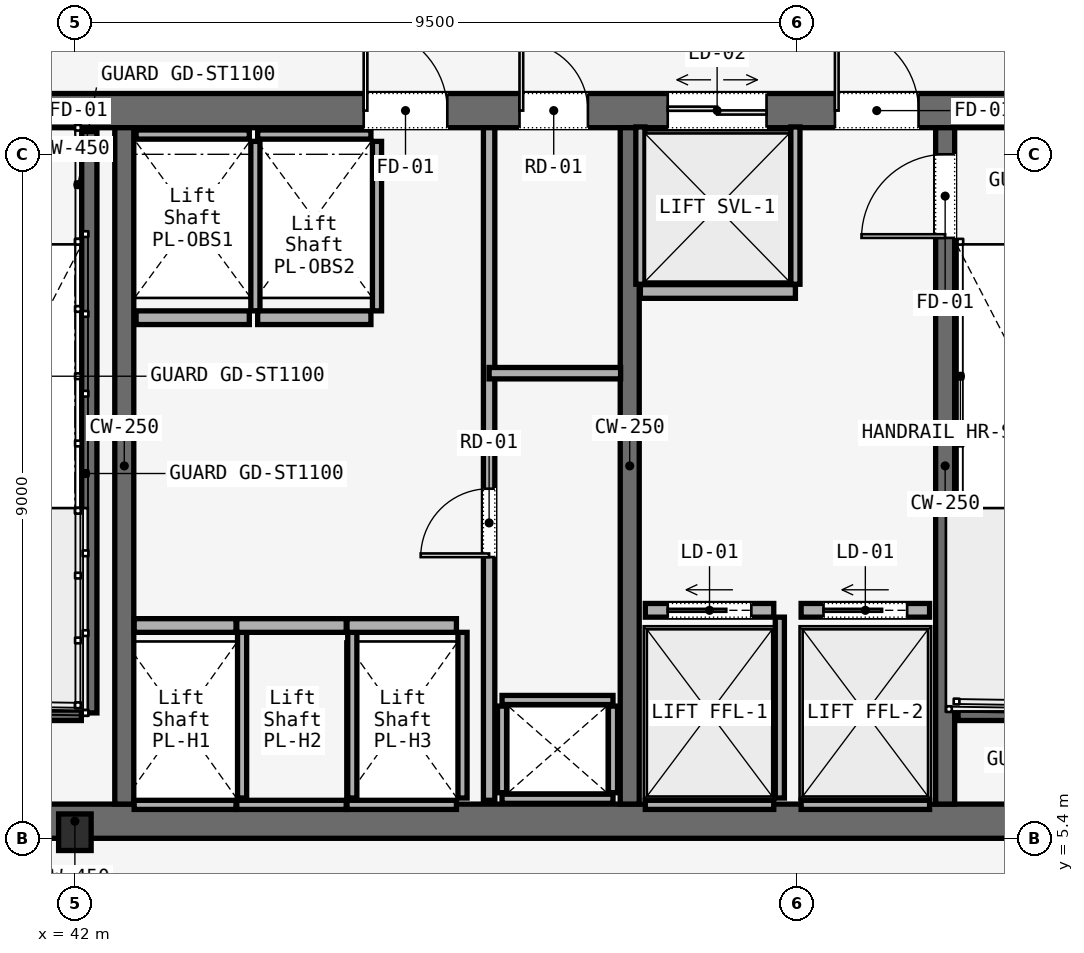
"""IFC4 building model, lengths in metres.
Left out: names, types, materials, properties, quantities, classifications, styles, units other than length and angle.
Written with IfcOpenShell. Run it as: python <this file> out.ifc"""

import sys

from ifc_helpers import new_model, si_unit, direction, frame, frame_2d, origin, origin_2d, place, context, subcontext, project, spatial, rectangle, i_section, extrude, element, fill, save


model = new_model("IFC4")
c1 = context("Model", 3, precision=1e-05, world=origin(), true_north=direction((0.0, 1.0)))
c2 = subcontext(c1, "Body", "Model", "MODEL_VIEW")
j1 = project(units=[si_unit("LENGTHUNIT", "METRE"), si_unit("PLANEANGLEUNIT", "RADIAN")], contexts=[c1])
p1 = place(None, origin())
s1 = spatial("IfcSite", under=j1, at=p1, CompositionType="ELEMENT")
p2 = place(p1, origin())
s2 = spatial("IfcBuilding", under=s1, at=p2, CompositionType="ELEMENT")
p3 = place(p2, frame((0.0, 0.0, 122.2)))
s3 = spatial("IfcBuildingStorey", under=s2, at=p3, CompositionType="ELEMENT", Elevation=122.2)
p4 = place(p3, frame((26.45, 14.975, 0.0), z_axis=(0.0, 0.0, 1.0), x_axis=(1.0, 0.0, 0.0)))
e1 = element("IfcWall", 1, at=p4, inside=s3, PredefinedType="SOLIDWALL", context=c2, shape_type="SweptSolid", body=[
    extrude(rectangle(XDim=31.1, YDim=0.45, at=frame_2d((15.55, 0.0))), origin(), (0.0, 0.0, 1.0), 4.58),
])
p5 = place(p4, frame((1.65, 0.0, 0.0)))
e2 = element("IfcOpeningElement", 2, at=p5, cuts=e1, PredefinedType="OPENING", context=c2, shape_type="SweptSolid", body=[
    extrude(rectangle(XDim=1.1, YDim=2.2, at=frame_2d((0.55, 1.1))), frame((0.0, 0.225, 0.0), z_axis=(0.0, -1.0, 0.0), x_axis=(1.0, 0.0, 0.0)), (0.0, 0.0, 1.0), 0.45),
])
p6 = place(p4, frame((13.65, 0.0, 0.0)))
e3 = element("IfcOpeningElement", 3, at=p6, cuts=e1, PredefinedType="OPENING", context=c2, shape_type="SweptSolid", body=[
    extrude(rectangle(XDim=1.1, YDim=2.2, at=frame_2d((0.55, 1.1))), frame((0.0, 0.225, 0.0), z_axis=(0.0, -1.0, 0.0), x_axis=(1.0, 0.0, 0.0)), (0.0, 0.0, 1.0), 0.45),
])
p7 = place(p4, frame((25.55, 0.0, 0.0)))
e4 = element("IfcOpeningElement", 4, at=p7, cuts=e1, PredefinedType="OPENING", context=c2, shape_type="SweptSolid", body=[
    extrude(rectangle(XDim=1.1, YDim=2.2, at=frame_2d((0.55, 1.1))), frame((0.0, 0.225, 0.0), z_axis=(0.0, -1.0, 0.0), x_axis=(1.0, 0.0, 0.0)), (0.0, 0.0, 1.0), 0.45),
])
p8 = place(p4, frame((10.7, 0.0, 0.0)))
e5 = element("IfcOpeningElement", 5, at=p8, cuts=e1, PredefinedType="OPENING", context=c2, shape_type="SweptSolid", body=[
    extrude(rectangle(XDim=1.4, YDim=2.2, at=frame_2d((0.7, 1.1))), frame((0.0, 0.225, 0.0), z_axis=(0.0, -1.0, 0.0), x_axis=(1.0, 0.0, 0.0)), (0.0, 0.0, 1.0), 0.45),
])
p9 = place(p4, frame((19.35, 0.0, 0.0)))
e6 = element("IfcOpeningElement", 6, at=p9, cuts=e1, PredefinedType="OPENING", context=c2, shape_type="SweptSolid", body=[
    extrude(rectangle(XDim=1.1, YDim=2.2, at=frame_2d((0.55, 1.1))), frame((0.0, 0.225, 0.0), z_axis=(0.0, -1.0, 0.0), x_axis=(1.0, 0.0, 0.0)), (0.0, 0.0, 1.0), 0.45),
])
p10 = place(p4, frame((21.4, 0.0, 0.0)))
e7 = element("IfcOpeningElement", 7, at=p10, cuts=e1, PredefinedType="OPENING", context=c2, shape_type="SweptSolid", body=[
    extrude(rectangle(XDim=0.9, YDim=2.1, at=frame_2d((0.45, 1.05))), frame((0.0, 0.225, 0.0), z_axis=(0.0, -1.0, 0.0), x_axis=(1.0, 0.0, 0.0)), (0.0, 0.0, 1.0), 0.45),
])
p11 = place(p4, frame((23.35, 0.0, 0.0)))
e8 = element("IfcOpeningElement", 8, at=p11, cuts=e1, PredefinedType="OPENING", context=c2, shape_type="SweptSolid", body=[
    extrude(rectangle(XDim=1.3, YDim=2.3, at=frame_2d((0.65, 1.15))), frame((0.0, 0.225, 0.0), z_axis=(0.0, -1.0, 0.0), x_axis=(1.0, 0.0, 0.0)), (0.0, 0.0, 1.0), 0.45),
])
p12 = place(p3, frame((26.45, 5.625, 0.0), z_axis=(0.0, 0.0, 1.0), x_axis=(1.0, 0.0, 0.0)))
e9 = element("IfcWall", 9, at=p12, inside=s3, PredefinedType="SOLIDWALL", context=c2, shape_type="SweptSolid", body=[
    extrude(rectangle(XDim=31.1, YDim=0.45, at=frame_2d((15.55, 0.0))), origin(), (0.0, 0.0, 1.0), 4.58),
])
for number, where, z_axis, x_axis in (
    (10, (42.65, 5.85, 0.0), (0.0, 0.0, 1.0), (0.0, 1.0, 0.0)),
    (11, (49.3, 5.85, 0.0), (0.0, 0.0, 1.0), (0.0, 1.0, 0.0)),
):
    element("IfcWall", number, at=place(p3, frame(where, z_axis=z_axis, x_axis=x_axis)), inside=s3, PredefinedType="SOLIDWALL", context=c2, shape_type="SweptSolid", body=[
        extrude(rectangle(XDim=8.9, YDim=0.25, at=frame_2d((4.45, 0.0))), origin(), (0.0, 0.0, 1.0), 4.58),
    ])
p13 = place(p3, frame((53.45, 5.85, 0.0), z_axis=(0.0, 0.0, 1.0), x_axis=(0.0, 1.0, 0.0)))
e12 = element("IfcWall", 12, at=p13, inside=s3, PredefinedType="SOLIDWALL", context=c2, shape_type="SweptSolid", body=[
    extrude(rectangle(XDim=8.9, YDim=0.25, at=frame_2d((4.45, 0.0))), origin(), (0.0, 0.0, 1.0), 4.58),
])
p14 = place(p13, frame((7.45, 0.0, 0.0)))
e13 = element("IfcOpeningElement", 13, at=p14, cuts=e12, PredefinedType="OPENING", context=c2, shape_type="SweptSolid", body=[
    extrude(rectangle(XDim=1.1, YDim=2.2, at=frame_2d((0.55, 1.1))), frame((0.0, 0.125, 0.0), z_axis=(0.0, -1.0, 0.0), x_axis=(1.0, 0.0, 0.0)), (0.0, 0.0, 1.0), 0.25),
])
p15 = place(p3, frame((42.0, 5.48, 0.0), z_axis=(0.0, 0.0, 1.0), x_axis=(1.0, 0.0, 0.0)))
e14 = element("IfcColumn", 14, at=p15, inside=s3, PredefinedType="COLUMN", context=c2, shape_type="SweptSolid", body=[
    extrude(i_section(OverallWidth=0.428, OverallDepth=0.481, WebThickness=0.051, FlangeThickness=0.065, FilletRadius=0.015, at=origin_2d()), origin(), (0.0, 0.0, 1.0), 4.58),
])
p16 = place(p3, frame((42.19, 14.7, 0.0), z_axis=(0.0, 0.0, 1.0), x_axis=(0.0, -1.0, 0.0)))
e15 = element("IfcWall", 15, at=p16, inside=s3, PredefinedType="SOLIDWALL", context=c2, shape_type="SweptSolid", body=[
    extrude(rectangle(XDim=7.65, YDim=0.2, at=frame_2d((3.825, 0.0))), origin(), (0.0, 0.0, 1.0), 4.8),
])
for number, where, z_axis, x_axis in (
    (16, (38.97, 7.05, 0.0), (0.0, 0.0, 1.0), (1.0, 0.0, 0.0)),
    (17, (53.62, 7.05, 0.0), (0.0, 0.0, 1.0), (1.0, 0.0, 0.0)),
):
    element("IfcWall", number, at=place(p3, frame(where, z_axis=z_axis, x_axis=x_axis)), inside=s3, PredefinedType="SOLIDWALL", context=c2, shape_type="SweptSolid", body=[
        extrude(rectangle(XDim=3.115, YDim=0.2, at=frame_2d((1.558, 0.0))), origin(), (0.0, 0.0, 1.0), 4.8),
    ])
for number, where, z_axis, x_axis in (
    (18, (47.62, 5.92, 0.0), (0.0, 0.0, 1.0), (1.0, 0.0, 0.0)),
    (19, (47.62, 7.22, 0.0), (0.0, 0.0, 1.0), (1.0, 0.0, 0.0)),
):
    element("IfcWall", number, at=place(p3, frame(where, z_axis=z_axis, x_axis=x_axis)), inside=s3, PredefinedType="SOLIDWALL", context=c2, shape_type="SweptSolid", body=[
        extrude(rectangle(XDim=1.46, YDim=0.12, at=frame_2d((0.73, 0.0))), origin(), (0.0, 0.0, 1.0), 4.01),
    ])
for number, where, z_axis, x_axis in (
    (20, (47.62, 6.0, 0.0), (0.0, 0.0, 1.0), (0.0, 1.0, 0.0)),
    (21, (49.08, 6.0, 0.0), (0.0, 0.0, 1.0), (0.0, 1.0, 0.0)),
):
    element("IfcWall", number, at=place(p3, frame(where, z_axis=z_axis, x_axis=x_axis)), inside=s3, PredefinedType="SOLIDWALL", context=c2, shape_type="SweptSolid", body=[
        extrude(rectangle(XDim=1.14, YDim=0.12, at=frame_2d((0.57, 0.0))), origin(), (0.0, 0.0, 1.0), 4.01),
    ])
p17 = place(p3, frame((47.45, 5.9, 0.0), z_axis=(0.0, 0.0, 1.0), x_axis=(0.0, 1.0, 0.0)))
e22 = element("IfcWall", 22, at=p17, inside=s3, PredefinedType="PARTITIONING", context=c2, shape_type="SweptSolid", body=[
    extrude(rectangle(XDim=8.85, YDim=0.15, at=frame_2d((4.425, 0.0))), origin(), (0.0, 0.0, 1.0), 4.01),
])
p18 = place(p17, frame((3.2, 0.0, 0.0)))
e23 = element("IfcOpeningElement", 23, at=p18, cuts=e22, PredefinedType="OPENING", context=c2, shape_type="SweptSolid", body=[
    extrude(rectangle(XDim=0.9, YDim=2.1, at=frame_2d((0.45, 1.05))), frame((0.0, 0.075, 0.0), z_axis=(0.0, -1.0, 0.0), x_axis=(1.0, 0.0, 0.0)), (0.0, 0.0, 1.0), 0.15),
])
p19 = place(p3, frame((47.45, 11.52, 0.0), z_axis=(0.0, 0.0, 1.0), x_axis=(1.0, 0.0, 0.0)))
e24 = element("IfcWall", 24, at=p19, inside=s3, PredefinedType="PARTITIONING", context=c2, shape_type="SweptSolid", body=[
    extrude(rectangle(XDim=1.73, YDim=0.15, at=frame_2d((0.865, 0.0))), origin(), (0.0, 0.0, 1.0), 4.01),
])
p20 = place(p3, frame((42.78, 8.2, 0.0), z_axis=(0.0, 0.0, 1.0), x_axis=(1.0, 0.0, 0.0)))
e25 = element("IfcWall", 25, at=p20, inside=s3, PredefinedType="SOLIDWALL", context=c2, shape_type="SweptSolid", body=[
    extrude(rectangle(XDim=1.34, YDim=0.18, at=frame_2d((0.67, 0.0))), origin(), (0.0, 0.0, 1.0), 4.01),
])
p21 = place(p3, frame((42.78, 5.84, 0.0), z_axis=(0.0, 0.0, 1.0), x_axis=(1.0, 0.0, 0.0)))
e26 = element("IfcWall", 26, at=p21, inside=s3, PredefinedType="SOLIDWALL", context=c2, shape_type="SweptSolid", body=[
    extrude(rectangle(XDim=1.34, YDim=0.12, at=frame_2d((0.67, 0.0))), origin(), (0.0, 0.0, 1.0), 4.01),
])
p22 = place(p3, frame((44.2, 5.93, 0.0), z_axis=(0.0, 0.0, 1.0), x_axis=(0.0, 1.0, 0.0)))
e27 = element("IfcWall", 27, at=p22, inside=s3, PredefinedType="SOLIDWALL", context=c2, shape_type="SweptSolid", body=[
    extrude(rectangle(XDim=2.18, YDim=0.12, at=frame_2d((1.09, 0.0))), origin(), (0.0, 0.0, 1.0), 4.01),
])
p23 = place(p3, frame((44.13, 8.2, 0.0), z_axis=(0.0, 0.0, 1.0), x_axis=(1.0, 0.0, 0.0)))
e28 = element("IfcWall", 28, at=p23, inside=s3, PredefinedType="SOLIDWALL", context=c2, shape_type="SweptSolid", body=[
    extrude(rectangle(XDim=1.44, YDim=0.18, at=frame_2d((0.72, 0.0))), origin(), (0.0, 0.0, 1.0), 4.01),
])
p24 = place(p3, frame((44.13, 5.84, 0.0), z_axis=(0.0, 0.0, 1.0), x_axis=(1.0, 0.0, 0.0)))
e29 = element("IfcWall", 29, at=p24, inside=s3, PredefinedType="SOLIDWALL", context=c2, shape_type="SweptSolid", body=[
    extrude(rectangle(XDim=1.44, YDim=0.12, at=frame_2d((0.72, 0.0))), origin(), (0.0, 0.0, 1.0), 4.01),
])
p25 = place(p3, frame((45.65, 5.93, 0.0), z_axis=(0.0, 0.0, 1.0), x_axis=(0.0, 1.0, 0.0)))
e30 = element("IfcWall", 30, at=p25, inside=s3, PredefinedType="SOLIDWALL", context=c2, shape_type="SweptSolid", body=[
    extrude(rectangle(XDim=2.18, YDim=0.12, at=frame_2d((1.09, 0.0))), origin(), (0.0, 0.0, 1.0), 4.01),
])
p26 = place(p3, frame((45.58, 8.2, 0.0), z_axis=(0.0, 0.0, 1.0), x_axis=(1.0, 0.0, 0.0)))
e31 = element("IfcWall", 31, at=p26, inside=s3, PredefinedType="SOLIDWALL", context=c2, shape_type="SweptSolid", body=[
    extrude(rectangle(XDim=1.44, YDim=0.18, at=frame_2d((0.72, 0.0))), origin(), (0.0, 0.0, 1.0), 4.01),
])
p27 = place(p3, frame((45.58, 5.84, 0.0), z_axis=(0.0, 0.0, 1.0), x_axis=(1.0, 0.0, 0.0)))
e32 = element("IfcWall", 32, at=p27, inside=s3, PredefinedType="SOLIDWALL", context=c2, shape_type="SweptSolid", body=[
    extrude(rectangle(XDim=1.44, YDim=0.12, at=frame_2d((0.72, 0.0))), origin(), (0.0, 0.0, 1.0), 4.01),
])
p28 = place(p3, frame((47.1, 5.93, 0.0), z_axis=(0.0, 0.0, 1.0), x_axis=(0.0, 1.0, 0.0)))
e33 = element("IfcWall", 33, at=p28, inside=s3, PredefinedType="SOLIDWALL", context=c2, shape_type="SweptSolid", body=[
    extrude(rectangle(XDim=2.18, YDim=0.12, at=frame_2d((1.09, 0.0))), origin(), (0.0, 0.0, 1.0), 4.01),
])
p29 = place(p3, frame((42.805, 12.25, 0.0), z_axis=(0.0, 0.0, 1.0), x_axis=(1.0, 0.0, 0.0)))
e34 = element("IfcWall", 34, at=p29, inside=s3, PredefinedType="SOLIDWALL", context=c2, shape_type="SweptSolid", body=[
    extrude(rectangle(XDim=1.49, YDim=0.18, at=frame_2d((0.745, 0.0))), origin(), (0.0, 0.0, 1.0), 4.01),
])
p30 = place(p3, frame((42.805, 14.66, 0.0), z_axis=(0.0, 0.0, 1.0), x_axis=(1.0, 0.0, 0.0)))
e35 = element("IfcWall", 35, at=p30, inside=s3, PredefinedType="SOLIDWALL", context=c2, shape_type="SweptSolid", body=[
    extrude(rectangle(XDim=1.49, YDim=0.12, at=frame_2d((0.745, 0.0))), origin(), (0.0, 0.0, 1.0), 4.01),
])
p31 = place(p3, frame((44.375, 12.34, 0.0), z_axis=(0.0, 0.0, 1.0), x_axis=(0.0, 1.0, 0.0)))
e36 = element("IfcWall", 36, at=p31, inside=s3, PredefinedType="SOLIDWALL", context=c2, shape_type="SweptSolid", body=[
    extrude(rectangle(XDim=2.23, YDim=0.12, at=frame_2d((1.115, 0.0))), origin(), (0.0, 0.0, 1.0), 4.01),
])
p32 = place(p3, frame((44.405, 12.25, 0.0), z_axis=(0.0, 0.0, 1.0), x_axis=(1.0, 0.0, 0.0)))
e37 = element("IfcWall", 37, at=p32, inside=s3, PredefinedType="SOLIDWALL", context=c2, shape_type="SweptSolid", body=[
    extrude(rectangle(XDim=1.49, YDim=0.18, at=frame_2d((0.745, 0.0))), origin(), (0.0, 0.0, 1.0), 4.01),
])
p33 = place(p3, frame((44.405, 14.66, 0.0), z_axis=(0.0, 0.0, 1.0), x_axis=(1.0, 0.0, 0.0)))
e38 = element("IfcWall", 38, at=p33, inside=s3, PredefinedType="SOLIDWALL", context=c2, shape_type="SweptSolid", body=[
    extrude(rectangle(XDim=1.49, YDim=0.12, at=frame_2d((0.745, 0.0))), origin(), (0.0, 0.0, 1.0), 4.01),
])
p34 = place(p3, frame((45.975, 12.34, 0.0), z_axis=(0.0, 0.0, 1.0), x_axis=(0.0, 1.0, 0.0)))
e39 = element("IfcWall", 39, at=p34, inside=s3, PredefinedType="SOLIDWALL", context=c2, shape_type="SweptSolid", body=[
    extrude(rectangle(XDim=2.23, YDim=0.12, at=frame_2d((1.115, 0.0))), origin(), (0.0, 0.0, 1.0), 4.01),
])
p35 = place(p3, frame((49.505, 8.4, 0.0), z_axis=(0.0, 0.0, 1.0), x_axis=(1.0, 0.0, 0.0)))
e40 = element("IfcWall", 40, at=p35, inside=s3, PredefinedType="SOLIDWALL", context=c2, shape_type="SweptSolid", body=[
    extrude(rectangle(XDim=1.69, YDim=0.18, at=frame_2d((0.845, 0.0))), origin(), (0.0, 0.0, 1.0), 4.01),
])
p36 = place(p35, frame((0.295, 0.0, 0.0)))
e41 = element("IfcOpeningElement", 41, at=p36, cuts=e40, PredefinedType="OPENING", context=c2, shape_type="SweptSolid", body=[
    extrude(rectangle(XDim=1.1, YDim=2.2, at=frame_2d((0.55, 1.1))), frame((0.0, 0.09, 0.0), z_axis=(0.0, -1.0, 0.0), x_axis=(1.0, 0.0, 0.0)), (0.0, 0.0, 1.0), 0.18),
])
p37 = place(p3, frame((49.505, 5.84, 0.0), z_axis=(0.0, 0.0, 1.0), x_axis=(1.0, 0.0, 0.0)))
e42 = element("IfcWall", 42, at=p37, inside=s3, PredefinedType="SOLIDWALL", context=c2, shape_type="SweptSolid", body=[
    extrude(rectangle(XDim=1.69, YDim=0.12, at=frame_2d((0.845, 0.0))), origin(), (0.0, 0.0, 1.0), 4.01),
])
p38 = place(p3, frame((51.275, 5.93, 0.0), z_axis=(0.0, 0.0, 1.0), x_axis=(0.0, 1.0, 0.0)))
e43 = element("IfcWall", 43, at=p38, inside=s3, PredefinedType="SOLIDWALL", context=c2, shape_type="SweptSolid", body=[
    extrude(rectangle(XDim=2.38, YDim=0.12, at=frame_2d((1.19, 0.0))), origin(), (0.0, 0.0, 1.0), 4.01),
])
p39 = place(p3, frame((51.555, 8.4, 0.0), z_axis=(0.0, 0.0, 1.0), x_axis=(1.0, 0.0, 0.0)))
e44 = element("IfcWall", 44, at=p39, inside=s3, PredefinedType="SOLIDWALL", context=c2, shape_type="SweptSolid", body=[
    extrude(rectangle(XDim=1.69, YDim=0.18, at=frame_2d((0.845, 0.0))), origin(), (0.0, 0.0, 1.0), 4.01),
])
p40 = place(p39, frame((0.295, 0.0, 0.0)))
e45 = element("IfcOpeningElement", 45, at=p40, cuts=e44, PredefinedType="OPENING", context=c2, shape_type="SweptSolid", body=[
    extrude(rectangle(XDim=1.1, YDim=2.2, at=frame_2d((0.55, 1.1))), frame((0.0, 0.09, 0.0), z_axis=(0.0, -1.0, 0.0), x_axis=(1.0, 0.0, 0.0)), (0.0, 0.0, 1.0), 0.18),
])
p41 = place(p3, frame((51.555, 5.84, 0.0), z_axis=(0.0, 0.0, 1.0), x_axis=(1.0, 0.0, 0.0)))
e46 = element("IfcWall", 46, at=p41, inside=s3, PredefinedType="SOLIDWALL", context=c2, shape_type="SweptSolid", body=[
    extrude(rectangle(XDim=1.69, YDim=0.12, at=frame_2d((0.845, 0.0))), origin(), (0.0, 0.0, 1.0), 4.01),
])
p42 = place(p3, frame((49.44, 12.595, 0.0), z_axis=(0.0, 0.0, 1.0), x_axis=(1.0, 0.0, 0.0)))
e47 = element("IfcWall", 47, at=p42, inside=s3, PredefinedType="SOLIDWALL", context=c2, shape_type="SweptSolid", body=[
    extrude(rectangle(XDim=2.04, YDim=0.18, at=frame_2d((1.02, 0.0))), origin(), (0.0, 0.0, 1.0), 4.01),
])
for number, where, z_axis, x_axis in (
    (48, (49.44, 12.69, 0.0), (0.0, 0.0, 1.0), (0.0, 1.0, 0.0)),
    (49, (51.48, 12.69, 0.0), (0.0, 0.0, 1.0), (0.0, 1.0, 0.0)),
):
    element("IfcWall", number, at=place(p3, frame(where, z_axis=z_axis, x_axis=x_axis)), inside=s3, PredefinedType="SOLIDWALL", context=c2, shape_type="SweptSolid", body=[
        extrude(rectangle(XDim=2.07, YDim=0.12, at=frame_2d((1.035, 0.0))), origin(), (0.0, 0.0, 1.0), 4.01),
    ])
p43 = place(p7, origin())
e50 = element("IfcDoor", 50, at=p43, inside=s3, OperationType="SINGLE_SWING_RIGHT", PredefinedType="DOOR", context=c2, shape_type="SweptSolid", body=[
    extrude(rectangle(XDim=1.1, YDim=2.2, at=frame_2d((0.55, 1.1))), frame((0.0, 0.025, 0.0), z_axis=(0.0, -1.0, 0.0), x_axis=(1.0, 0.0, 0.0)), (0.0, 0.0, 1.0), 0.05),
])
fill(e4, e50)
p44 = place(p9, origin())
e51 = element("IfcDoor", 51, at=p44, inside=s3, OperationType="SINGLE_SWING_LEFT", PredefinedType="DOOR", context=c2, shape_type="SweptSolid", body=[
    extrude(rectangle(XDim=1.1, YDim=2.2, at=frame_2d((0.55, 1.1))), frame((0.0, 0.025, 0.0), z_axis=(0.0, -1.0, 0.0), x_axis=(1.0, 0.0, 0.0)), (0.0, 0.0, 1.0), 0.05),
])
fill(e6, e51)
p45 = place(p10, origin())
e52 = element("IfcDoor", 52, at=p45, inside=s3, OperationType="SINGLE_SWING_LEFT", PredefinedType="DOOR", context=c2, shape_type="SweptSolid", body=[
    extrude(rectangle(XDim=0.9, YDim=2.1, at=frame_2d((0.45, 1.05))), frame((0.0, 0.025, 0.0), z_axis=(0.0, -1.0, 0.0), x_axis=(1.0, 0.0, 0.0)), (0.0, 0.0, 1.0), 0.05),
])
fill(e7, e52)
p46 = place(p14, origin())
e53 = element("IfcDoor", 53, at=p46, inside=s3, OperationType="SINGLE_SWING_LEFT", PredefinedType="DOOR", context=c2, shape_type="SweptSolid", body=[
    extrude(rectangle(XDim=1.1, YDim=2.2, at=frame_2d((0.55, 1.1))), frame((0.0, 0.025, 0.0), z_axis=(0.0, -1.0, 0.0), x_axis=(1.0, 0.0, 0.0)), (0.0, 0.0, 1.0), 0.05),
])
fill(e13, e53)
p47 = place(p18, origin())
e54 = element("IfcDoor", 54, at=p47, inside=s3, OperationType="SINGLE_SWING_LEFT", PredefinedType="DOOR", context=c2, shape_type="SweptSolid", body=[
    extrude(rectangle(XDim=0.9, YDim=2.1, at=frame_2d((0.45, 1.05))), frame((0.0, 0.025, 0.0), z_axis=(0.0, -1.0, 0.0), x_axis=(1.0, 0.0, 0.0)), (0.0, 0.0, 1.0), 0.05),
])
fill(e23, e54)
p48 = place(p36, origin())
e55 = element("IfcDoor", 55, at=p48, inside=s3, OperationType="SLIDING_TO_LEFT", PredefinedType="DOOR", context=c2, shape_type="SweptSolid", body=[
    extrude(rectangle(XDim=1.1, YDim=2.2, at=frame_2d((0.55, 1.1))), frame((0.0, 0.025, 0.0), z_axis=(0.0, -1.0, 0.0), x_axis=(1.0, 0.0, 0.0)), (0.0, 0.0, 1.0), 0.05),
])
fill(e41, e55)
p49 = place(p40, origin())
e56 = element("IfcDoor", 56, at=p49, inside=s3, OperationType="SLIDING_TO_LEFT", PredefinedType="DOOR", context=c2, shape_type="SweptSolid", body=[
    extrude(rectangle(XDim=1.1, YDim=2.2, at=frame_2d((0.55, 1.1))), frame((0.0, 0.025, 0.0), z_axis=(0.0, -1.0, 0.0), x_axis=(1.0, 0.0, 0.0)), (0.0, 0.0, 1.0), 0.05),
])
fill(e45, e56)
p50 = place(p11, origin())
e57 = element("IfcDoor", 57, at=p50, inside=s3, OperationType="DOUBLE_DOOR_SLIDING", PredefinedType="DOOR", context=c2, shape_type="SweptSolid", body=[
    extrude(rectangle(XDim=1.3, YDim=2.3, at=frame_2d((0.65, 1.15))), frame((0.0, 0.025, 0.0), z_axis=(0.0, -1.0, 0.0), x_axis=(1.0, 0.0, 0.0)), (0.0, 0.0, 1.0), 0.05),
])
fill(e8, e57)
save(model, sys.argv[1])
